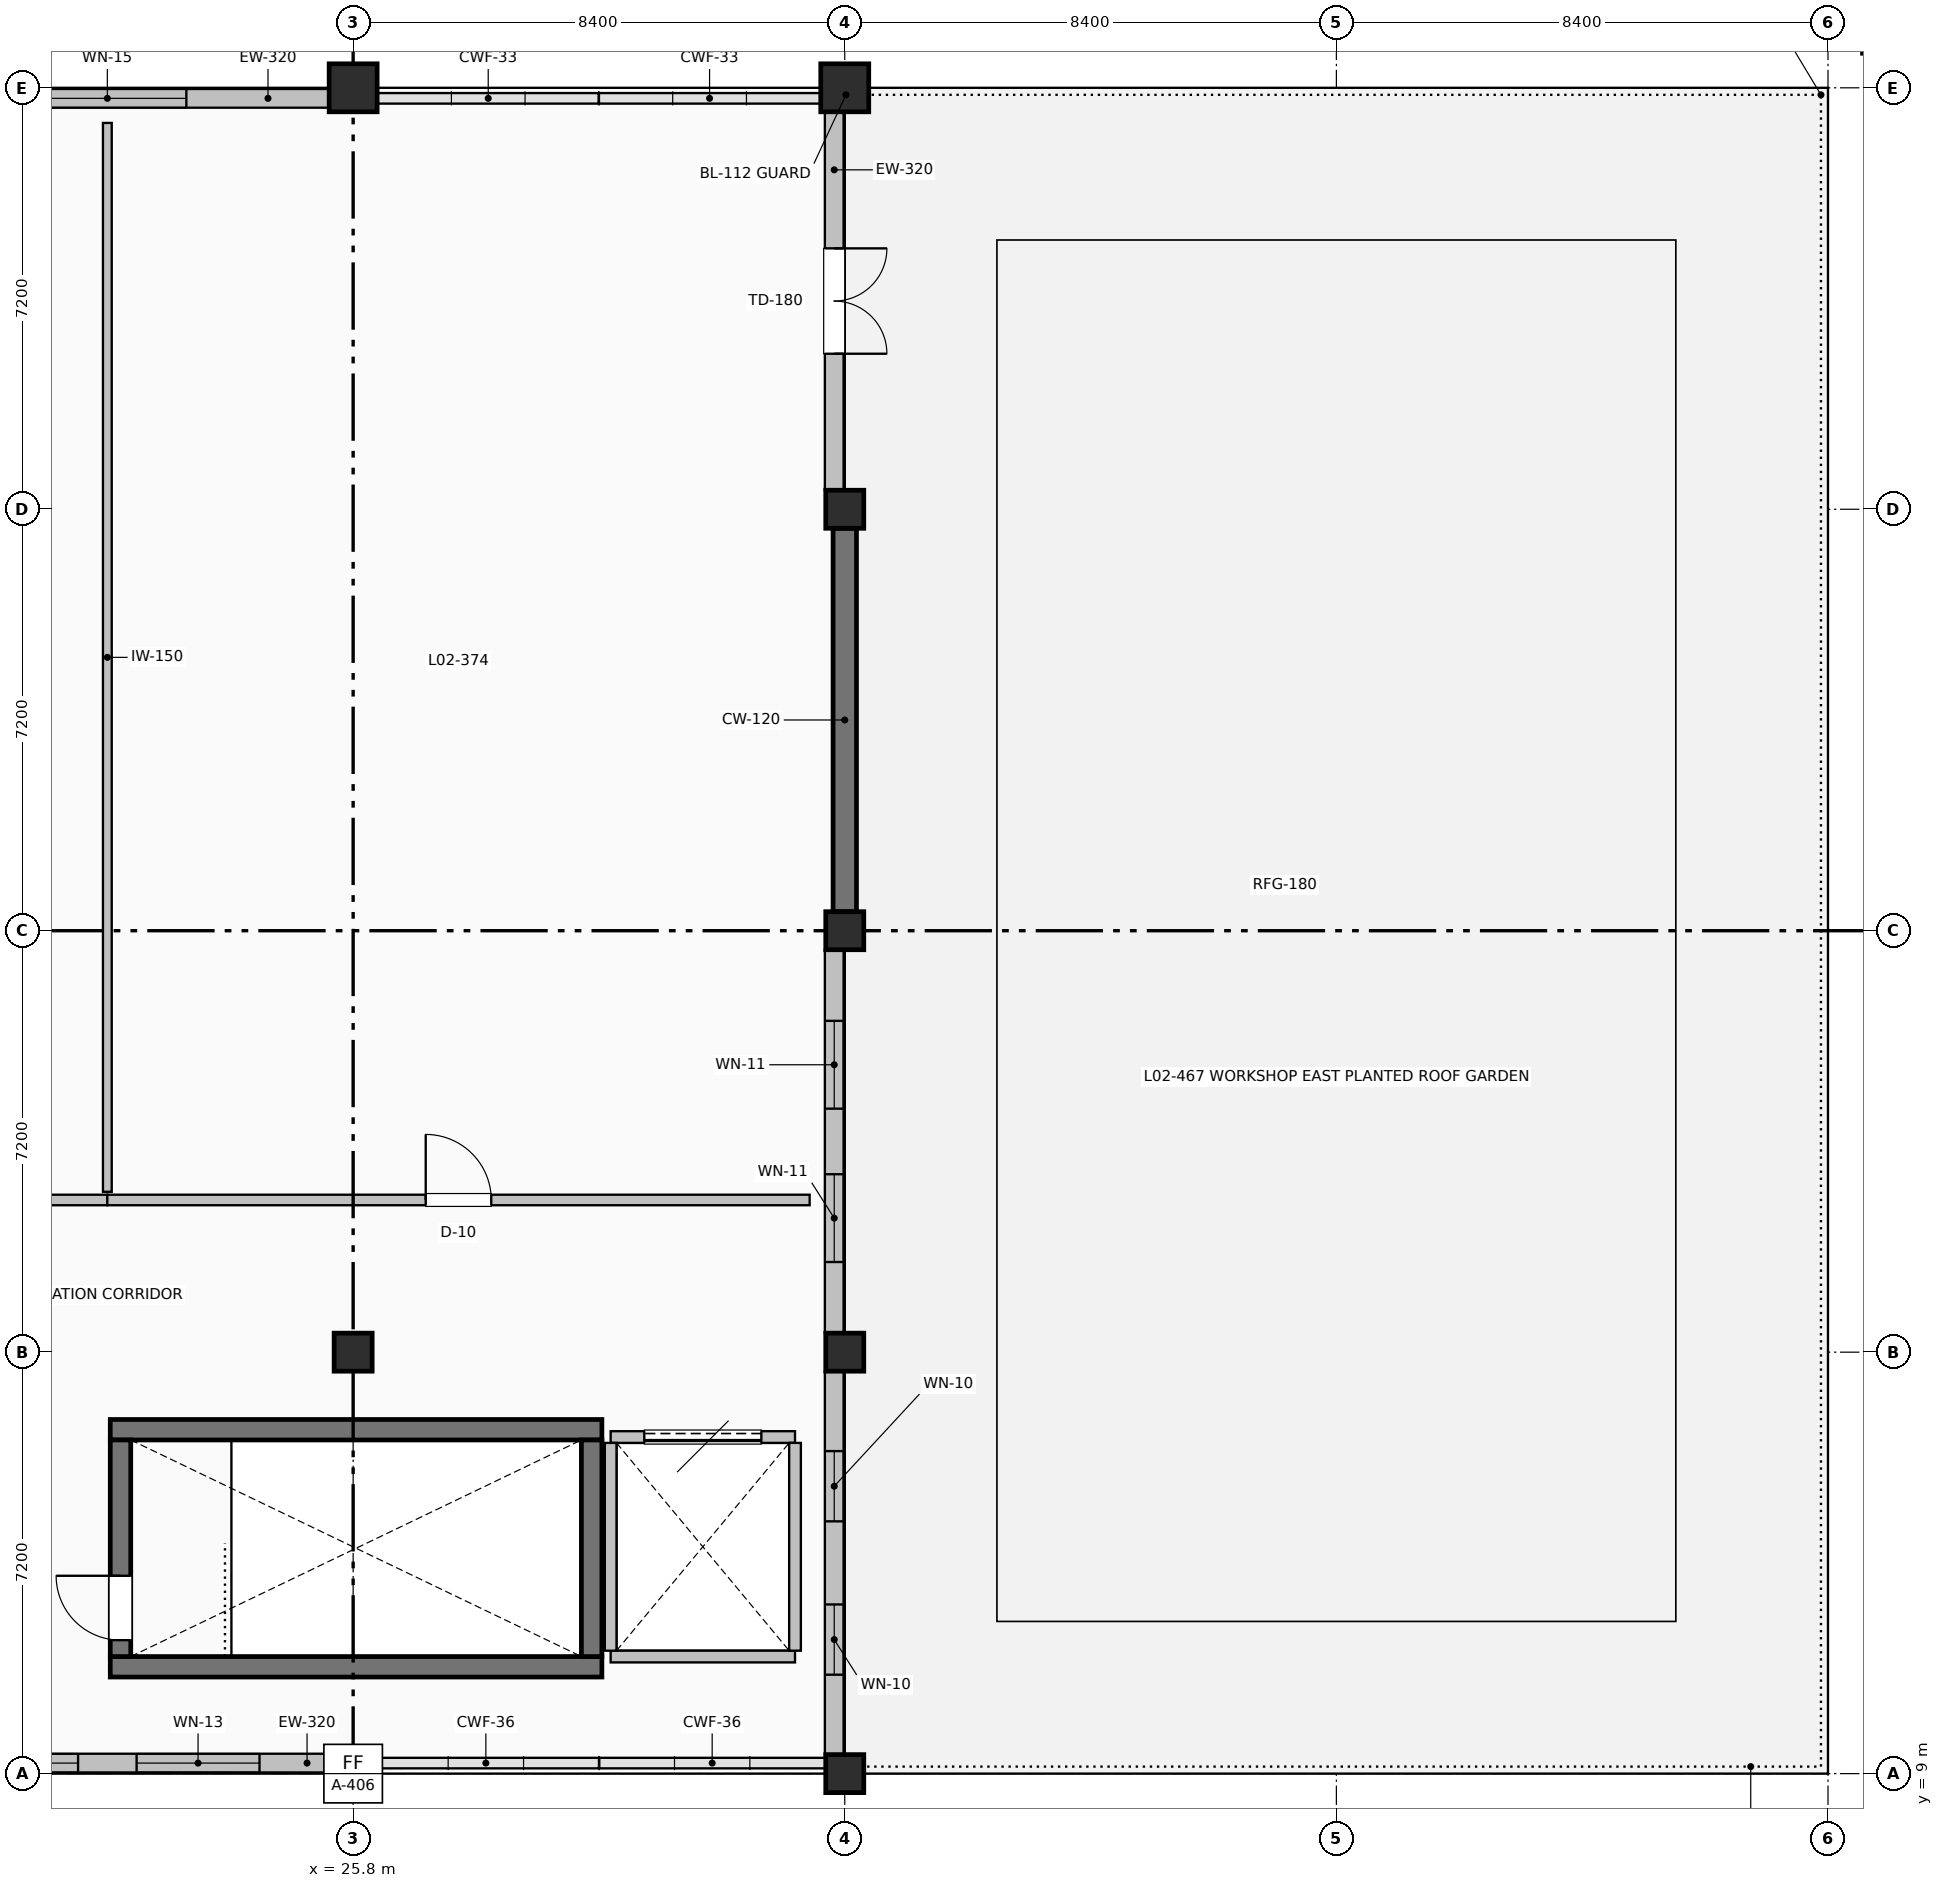
"""IFC4 building model, lengths in metres.
Left out: names, types, materials, properties, quantities, classifications, styles, units other than length and angle.
Written with IfcOpenShell. Run it as: python <this file> out.ifc"""

import sys

from ifc_helpers import new_model, si_unit, direction, frame, frame_2d, origin, origin_2d, place, context, subcontext, project, spatial, rectangle, extrude, element, fill, save


model = new_model("IFC4")
c1 = context("Model", 3, precision=1e-05, world=origin(), true_north=direction((0.0, 1.0)))
c2 = subcontext(c1, "Body", "Model", "MODEL_VIEW")
j1 = project(units=[si_unit("LENGTHUNIT", "METRE"), si_unit("PLANEANGLEUNIT", "RADIAN")], contexts=[c1])
p1 = place(None, origin())
s1 = spatial("IfcSite", under=j1, at=p1, CompositionType="ELEMENT")
p2 = place(p1, origin())
s2 = spatial("IfcBuilding", under=s1, at=p2, CompositionType="ELEMENT")
p3 = place(p2, frame((0.0, 0.0, 10.2)))
s3 = spatial("IfcBuildingStorey", under=s2, at=p3, CompositionType="ELEMENT", Elevation=10.2)
p4 = place(p3, frame((52.0, 38.8, 0.0), z_axis=(0.0, 0.0, 1.0), x_axis=(1.0, 0.0, 0.0)))
e1 = element("IfcColumn", 1, at=p4, inside=s3, PredefinedType="COLUMN", context=c2, shape_type="SweptSolid", body=[
    extrude(rectangle(XDim=0.82, YDim=0.82, at=origin_2d()), origin(), (0.0, 0.0, 1.0), 4.8),
])
for number, where, z_axis, x_axis in (
    (2, (25.8, 9.0, 0.0), (0.0, 0.0, 1.0), (1.0, 0.0, 0.0)),
    (3, (25.8, 16.2, 0.0), (0.0, 0.0, 1.0), (1.0, 0.0, 0.0)),
):
    element("IfcColumn", number, at=place(p3, frame(where, z_axis=z_axis, x_axis=x_axis)), inside=s3, PredefinedType="COLUMN", context=c2, shape_type="SweptSolid", body=[
        extrude(rectangle(XDim=0.65, YDim=0.65, at=origin_2d()), origin(), (0.0, 0.0, 1.0), 4.8),
    ])
p5 = place(p3, frame((25.8, 37.8, 0.0), z_axis=(0.0, 0.0, 1.0), x_axis=(1.0, 0.0, 0.0)))
e4 = element("IfcColumn", 4, at=p5, inside=s3, PredefinedType="COLUMN", context=c2, shape_type="SweptSolid", body=[
    extrude(rectangle(XDim=0.82, YDim=0.82, at=origin_2d()), origin(), (0.0, 0.0, 1.0), 4.8),
])
for number, where, z_axis, x_axis in (
    (5, (34.2, 9.0, 0.0), (0.0, 0.0, 1.0), (1.0, 0.0, 0.0)),
    (6, (34.2, 16.2, 0.0), (0.0, 0.0, 1.0), (1.0, 0.0, 0.0)),
    (7, (34.2, 23.4, 0.0), (0.0, 0.0, 1.0), (1.0, 0.0, 0.0)),
    (8, (34.2, 30.6, 0.0), (0.0, 0.0, 1.0), (1.0, 0.0, 0.0)),
):
    element("IfcColumn", number, at=place(p3, frame(where, z_axis=z_axis, x_axis=x_axis)), inside=s3, PredefinedType="COLUMN", context=c2, shape_type="SweptSolid", body=[
        extrude(rectangle(XDim=0.65, YDim=0.65, at=origin_2d()), origin(), (0.0, 0.0, 1.0), 4.8),
    ])
p6 = place(p3, frame((34.2, 37.8, 0.0), z_axis=(0.0, 0.0, 1.0), x_axis=(1.0, 0.0, 0.0)))
e9 = element("IfcColumn", 9, at=p6, inside=s3, PredefinedType="COLUMN", context=c2, shape_type="SweptSolid", body=[
    extrude(rectangle(XDim=0.82, YDim=0.82, at=origin_2d()), origin(), (0.0, 0.0, 1.0), 4.8),
])
for number, where, z_axis, x_axis in (
    (10, (21.65, 10.825, 0.0), (0.0, 0.0, 1.0), (1.0, 0.0, 0.0)),
    (11, (30.05, 14.875, 0.0), (0.0, 0.0, 1.0), (-1.0, 0.0, 0.0)),
):
    element("IfcWall", number, at=place(p3, frame(where, z_axis=z_axis, x_axis=x_axis)), inside=s3, PredefinedType="SHEAR", context=c2, shape_type="SweptSolid", body=[
        extrude(rectangle(XDim=8.4, YDim=0.35, at=frame_2d((4.2, 0.0))), origin(), (0.0, 0.0, 1.0), 4.58),
    ])
p7 = place(p3, frame((21.825, 11.0, 0.0), z_axis=(0.0, 0.0, 1.0), x_axis=(0.0, 1.0, 0.0)))
e12 = element("IfcWall", 12, at=p7, inside=s3, PredefinedType="SHEAR", context=c2, shape_type="SweptSolid", body=[
    extrude(rectangle(XDim=3.7, YDim=0.35, at=frame_2d((1.85, 0.0))), origin(), (0.0, 0.0, 1.0), 4.58),
])
p8 = place(p7, frame((0.28, 0.0, 0.0)))
e13 = element("IfcOpeningElement", 13, at=p8, cuts=e12, PredefinedType="OPENING", context=c2, shape_type="SweptSolid", body=[
    extrude(rectangle(XDim=1.1, YDim=2.08, at=frame_2d((0.55, 1.04))), frame((0.0, 0.185, 0.0), z_axis=(0.0, -1.0, 0.0), x_axis=(1.0, 0.0, 0.0)), (0.0, 0.0, 1.0), 0.37),
])
p9 = place(p3, frame((29.875, 14.7, 0.0), z_axis=(0.0, 0.0, 1.0), x_axis=(0.0, -1.0, 0.0)))
e14 = element("IfcWall", 14, at=p9, inside=s3, PredefinedType="SHEAR", context=c2, shape_type="SweptSolid", body=[
    extrude(rectangle(XDim=3.7, YDim=0.35, at=frame_2d((1.85, 0.0))), origin(), (0.0, 0.0, 1.0), 4.58),
])
p10 = place(p3, frame((34.2, 23.725, 0.0), z_axis=(0.0, 0.0, 1.0), x_axis=(0.0, 1.0, 0.0)))
e15 = element("IfcWall", 15, at=p10, inside=s3, PredefinedType="SHEAR", context=c2, shape_type="SweptSolid", body=[
    extrude(rectangle(XDim=6.55, YDim=0.4, at=frame_2d((3.275, 0.0))), origin(), (0.0, 0.0, 1.0), 4.48),
])
p11 = place(p3, frame((34.02, 37.39, 0.0), z_axis=(0.0, 0.0, 1.0), x_axis=(0.0, -1.0, 0.0)))
e16 = element("IfcWall", 16, at=p11, inside=s3, PredefinedType="SOLIDWALL", context=c2, shape_type="SweptSolid", body=[
    extrude(rectangle(XDim=6.465, YDim=0.32, at=frame_2d((3.232, 0.0))), origin(), (0.0, 0.0, 1.0), 3.822),
])
p12 = place(p11, frame((2.333, 0.0, 0.0)))
e17 = element("IfcOpeningElement", 17, at=p12, cuts=e16, PredefinedType="OPENING", context=c2, shape_type="SweptSolid", body=[
    extrude(rectangle(XDim=1.8, YDim=2.2, at=frame_2d((0.9, 1.1))), frame((0.0, 0.17, 0.0), z_axis=(0.0, -1.0, 0.0), x_axis=(1.0, 0.0, 0.0)), (0.0, 0.0, 1.0), 0.34),
])
p13 = place(p3, frame((34.02, 23.075, 0.0), z_axis=(0.0, 0.0, 1.0), x_axis=(0.0, -1.0, 0.0)))
e18 = element("IfcWall", 18, at=p13, inside=s3, PredefinedType="SOLIDWALL", context=c2, shape_type="SweptSolid", body=[
    extrude(rectangle(XDim=6.55, YDim=0.32, at=frame_2d((3.275, 0.0))), origin(), (0.0, 0.0, 1.0), 3.822),
])
p14 = place(p13, frame((1.215, 0.0, 0.95)))
e19 = element("IfcOpeningElement", 19, at=p14, cuts=e18, PredefinedType="OPENING", context=c2, shape_type="SweptSolid", body=[
    extrude(rectangle(XDim=1.5, YDim=1.9, at=frame_2d((0.75, 0.95))), frame((0.0, 0.17, 0.0), z_axis=(0.0, -1.0, 0.0), x_axis=(1.0, 0.0, 0.0)), (0.0, 0.0, 1.0), 0.34),
])
p15 = place(p13, frame((3.835, 0.0, 0.95)))
e20 = element("IfcOpeningElement", 20, at=p15, cuts=e18, PredefinedType="OPENING", context=c2, shape_type="SweptSolid", body=[
    extrude(rectangle(XDim=1.5, YDim=1.9, at=frame_2d((0.75, 0.95))), frame((0.0, 0.17, 0.0), z_axis=(0.0, -1.0, 0.0), x_axis=(1.0, 0.0, 0.0)), (0.0, 0.0, 1.0), 0.34),
])
p16 = place(p3, frame((34.02, 15.875, 0.0), z_axis=(0.0, 0.0, 1.0), x_axis=(0.0, -1.0, 0.0)))
e21 = element("IfcWall", 21, at=p16, inside=s3, PredefinedType="SOLIDWALL", context=c2, shape_type="SweptSolid", body=[
    extrude(rectangle(XDim=6.55, YDim=0.32, at=frame_2d((3.275, 0.0))), origin(), (0.0, 0.0, 1.0), 3.822),
])
p17 = place(p16, frame((1.365, 0.0, 0.95)))
e22 = element("IfcOpeningElement", 22, at=p17, cuts=e21, PredefinedType="OPENING", context=c2, shape_type="SweptSolid", body=[
    extrude(rectangle(XDim=1.2, YDim=1.9, at=frame_2d((0.6, 0.95))), frame((0.0, 0.17, 0.0), z_axis=(0.0, -1.0, 0.0), x_axis=(1.0, 0.0, 0.0)), (0.0, 0.0, 1.0), 0.34),
])
p18 = place(p16, frame((3.985, 0.0, 0.95)))
e23 = element("IfcOpeningElement", 23, at=p18, cuts=e21, PredefinedType="OPENING", context=c2, shape_type="SweptSolid", body=[
    extrude(rectangle(XDim=1.2, YDim=1.9, at=frame_2d((0.6, 0.95))), frame((0.0, 0.17, 0.0), z_axis=(0.0, -1.0, 0.0), x_axis=(1.0, 0.0, 0.0)), (0.0, 0.0, 1.0), 0.34),
])
p19 = place(p3, frame((17.81, 37.62, 0.0), z_axis=(0.0, 0.0, 1.0), x_axis=(1.0, 0.0, 0.0)))
e24 = element("IfcWall", 24, at=p19, inside=s3, PredefinedType="SOLIDWALL", context=c2, shape_type="SweptSolid", body=[
    extrude(rectangle(XDim=7.58, YDim=0.32, at=frame_2d((3.79, 0.0))), origin(), (0.0, 0.0, 1.0), 3.722),
])
p20 = place(p19, frame((2.44, 0.0, 0.95)))
e25 = element("IfcOpeningElement", 25, at=p20, cuts=e24, PredefinedType="OPENING", context=c2, shape_type="SweptSolid", body=[
    extrude(rectangle(XDim=2.7, YDim=1.9, at=frame_2d((1.35, 0.95))), frame((0.0, 0.17, 0.0), z_axis=(0.0, -1.0, 0.0), x_axis=(1.0, 0.0, 0.0)), (0.0, 0.0, 1.0), 0.34),
])
p21 = place(p3, frame((25.475, 9.18, 0.0), z_axis=(0.0, 0.0, 1.0), x_axis=(-1.0, 0.0, 0.0)))
e26 = element("IfcWall", 26, at=p21, inside=s3, PredefinedType="SOLIDWALL", context=c2, shape_type="SweptSolid", body=[
    extrude(rectangle(XDim=7.75, YDim=0.32, at=frame_2d((3.875, 0.0))), origin(), (0.0, 0.0, 1.0), 3.672),
])
p22 = place(p21, frame((1.275, 0.0, 0.95)))
e27 = element("IfcOpeningElement", 27, at=p22, cuts=e26, PredefinedType="OPENING", context=c2, shape_type="SweptSolid", body=[
    extrude(rectangle(XDim=2.1, YDim=1.9, at=frame_2d((1.05, 0.95))), frame((0.0, 0.17, 0.0), z_axis=(0.0, -1.0, 0.0), x_axis=(1.0, 0.0, 0.0)), (0.0, 0.0, 1.0), 0.34),
])
p23 = place(p21, frame((4.375, 0.0, 0.95)))
e28 = element("IfcOpeningElement", 28, at=p23, cuts=e26, PredefinedType="OPENING", context=c2, shape_type="SweptSolid", body=[
    extrude(rectangle(XDim=2.1, YDim=1.9, at=frame_2d((1.05, 0.95))), frame((0.0, 0.17, 0.0), z_axis=(0.0, -1.0, 0.0), x_axis=(1.0, 0.0, 0.0)), (0.0, 0.0, 1.0), 0.34),
])
p24 = place(p3, frame((30.2, 11.0, 0.0), z_axis=(0.0, 0.0, 1.0), x_axis=(1.0, 0.0, 0.0)))
e29 = element("IfcWall", 29, at=p24, inside=s3, PredefinedType="PARTITIONING", context=c2, shape_type="SweptSolid", body=[
    extrude(rectangle(XDim=3.15, YDim=0.2, at=frame_2d((1.575, 0.0))), origin(), (0.0, 0.0, 1.0), 4.492),
])
p25 = place(p3, frame((33.35, 14.75, 0.0), z_axis=(0.0, 0.0, 1.0), x_axis=(-1.0, 0.0, 0.0)))
e30 = element("IfcWall", 30, at=p25, inside=s3, PredefinedType="PARTITIONING", context=c2, shape_type="SweptSolid", body=[
    extrude(rectangle(XDim=3.15, YDim=0.2, at=frame_2d((1.575, 0.0))), origin(), (0.0, 0.0, 1.0), 4.492),
])
p26 = place(p25, frame((0.575, 0.0, 0.0)))
e31 = element("IfcOpeningElement", 31, at=p26, cuts=e30, PredefinedType="OPENING", context=c2, shape_type="SweptSolid", body=[
    extrude(rectangle(XDim=2.0, YDim=2.35, at=frame_2d((1.0, 1.175))), frame((0.0, 0.11, 0.0), z_axis=(0.0, -1.0, 0.0), x_axis=(1.0, 0.0, 0.0)), (0.0, 0.0, 1.0), 0.22),
])
for number, where, z_axis, x_axis in (
    (32, (30.2, 11.1, 0.0), (0.0, 0.0, 1.0), (0.0, 1.0, 0.0)),
    (33, (33.35, 14.65, 0.0), (0.0, 0.0, 1.0), (0.0, -1.0, 0.0)),
):
    element("IfcWall", number, at=place(p3, frame(where, z_axis=z_axis, x_axis=x_axis)), inside=s3, PredefinedType="PARTITIONING", context=c2, shape_type="SweptSolid", body=[
        extrude(rectangle(XDim=3.55, YDim=0.2, at=frame_2d((1.775, 0.0))), origin(), (0.0, 0.0, 1.0), 4.492),
    ])
p27 = place(p3, frame((9.6, 18.8, 0.0), z_axis=(0.0, 0.0, 1.0), x_axis=(1.0, 0.0, 0.0)))
e34 = element("IfcWall", 34, at=p27, inside=s3, PredefinedType="PARTITIONING", context=c2, shape_type="SweptSolid", body=[
    extrude(rectangle(XDim=12.0, YDim=0.18, at=frame_2d((6.0, 0.0))), origin(), (0.0, 0.0, 1.0), 4.492),
])
p28 = place(p27, frame((5.475, 0.0, 0.0)))
e35 = element("IfcOpeningElement", 35, at=p28, cuts=e34, PredefinedType="OPENING", context=c2, shape_type="SweptSolid", body=[
    extrude(rectangle(XDim=1.05, YDim=2.1, at=frame_2d((0.525, 1.05))), frame((0.0, 0.1, 0.0), z_axis=(0.0, -1.0, 0.0), x_axis=(1.0, 0.0, 0.0)), (0.0, 0.0, 1.0), 0.2),
])
p29 = place(p3, frame((21.6, 18.94, 0.0), z_axis=(0.0, 0.0, 1.0), x_axis=(0.0, 1.0, 0.0)))
e36 = element("IfcWall", 36, at=p29, inside=s3, PredefinedType="PARTITIONING", context=c2, shape_type="SweptSolid", body=[
    extrude(rectangle(XDim=18.26, YDim=0.15, at=frame_2d((9.13, 0.0))), origin(), (0.0, 0.0, 1.0), 4.492),
])
p30 = place(p3, frame((21.6, 18.8, 0.0), z_axis=(0.0, 0.0, 1.0), x_axis=(1.0, 0.0, 0.0)))
e37 = element("IfcWall", 37, at=p30, inside=s3, PredefinedType="PARTITIONING", context=c2, shape_type="SweptSolid", body=[
    extrude(rectangle(XDim=12.0, YDim=0.18, at=frame_2d((6.0, 0.0))), origin(), (0.0, 0.0, 1.0), 4.492),
])
p31 = place(p30, frame((5.44, 0.0, 0.0)))
e38 = element("IfcOpeningElement", 38, at=p31, cuts=e37, PredefinedType="OPENING", context=c2, shape_type="SweptSolid", body=[
    extrude(rectangle(XDim=1.12, YDim=2.12, at=frame_2d((0.56, 1.06))), frame((0.0, 0.1, 0.0), z_axis=(0.0, -1.0, 0.0), x_axis=(1.0, 0.0, 0.0)), (0.0, 0.0, 1.0), 0.2),
])
p32 = place(p12, origin())
e39 = element("IfcDoor", 39, at=p32, inside=s3, OperationType="DOUBLE_DOOR_SINGLE_SWING", PredefinedType="DOOR", context=c2, shape_type="SweptSolid", body=[
    extrude(rectangle(XDim=1.8, YDim=2.2, at=frame_2d((0.9, 1.1))), frame((0.0, 0.025, 0.0), z_axis=(0.0, -1.0, 0.0), x_axis=(1.0, 0.0, 0.0)), (0.0, 0.0, 1.0), 0.05),
])
fill(e17, e39)
p33 = place(p14, origin())
e40 = element("IfcWindow", 40, at=p33, inside=s3, PartitioningType="SINGLE_PANEL", PredefinedType="WINDOW", context=c2, shape_type="SweptSolid", body=[
    extrude(rectangle(XDim=1.5, YDim=1.9, at=frame_2d((0.75, 0.95))), frame((0.0, 0.03, 0.0), z_axis=(0.0, -1.0, 0.0), x_axis=(1.0, 0.0, 0.0)), (0.0, 0.0, 1.0), 0.06),
])
fill(e19, e40)
p34 = place(p15, origin())
e41 = element("IfcWindow", 41, at=p34, inside=s3, PartitioningType="SINGLE_PANEL", PredefinedType="WINDOW", context=c2, shape_type="SweptSolid", body=[
    extrude(rectangle(XDim=1.5, YDim=1.9, at=frame_2d((0.75, 0.95))), frame((0.0, 0.03, 0.0), z_axis=(0.0, -1.0, 0.0), x_axis=(1.0, 0.0, 0.0)), (0.0, 0.0, 1.0), 0.06),
])
fill(e20, e41)
p35 = place(p17, origin())
e42 = element("IfcWindow", 42, at=p35, inside=s3, PartitioningType="SINGLE_PANEL", PredefinedType="WINDOW", context=c2, shape_type="SweptSolid", body=[
    extrude(rectangle(XDim=1.2, YDim=1.9, at=frame_2d((0.6, 0.95))), frame((0.0, 0.03, 0.0), z_axis=(0.0, -1.0, 0.0), x_axis=(1.0, 0.0, 0.0)), (0.0, 0.0, 1.0), 0.06),
])
fill(e22, e42)
p36 = place(p18, origin())
e43 = element("IfcWindow", 43, at=p36, inside=s3, PartitioningType="SINGLE_PANEL", PredefinedType="WINDOW", context=c2, shape_type="SweptSolid", body=[
    extrude(rectangle(XDim=1.2, YDim=1.9, at=frame_2d((0.6, 0.95))), frame((0.0, 0.03, 0.0), z_axis=(0.0, -1.0, 0.0), x_axis=(1.0, 0.0, 0.0)), (0.0, 0.0, 1.0), 0.06),
])
fill(e23, e43)
p37 = place(p20, origin())
e44 = element("IfcWindow", 44, at=p37, inside=s3, PartitioningType="SINGLE_PANEL", PredefinedType="WINDOW", context=c2, shape_type="SweptSolid", body=[
    extrude(rectangle(XDim=2.7, YDim=1.9, at=frame_2d((1.35, 0.95))), frame((0.0, 0.03, 0.0), z_axis=(0.0, -1.0, 0.0), x_axis=(1.0, 0.0, 0.0)), (0.0, 0.0, 1.0), 0.06),
])
fill(e25, e44)
p38 = place(p22, origin())
e45 = element("IfcWindow", 45, at=p38, inside=s3, PartitioningType="SINGLE_PANEL", PredefinedType="WINDOW", context=c2, shape_type="SweptSolid", body=[
    extrude(rectangle(XDim=2.1, YDim=1.9, at=frame_2d((1.05, 0.95))), frame((0.0, 0.03, 0.0), z_axis=(0.0, -1.0, 0.0), x_axis=(1.0, 0.0, 0.0)), (0.0, 0.0, 1.0), 0.06),
])
fill(e27, e45)
p39 = place(p23, origin())
e46 = element("IfcWindow", 46, at=p39, inside=s3, PartitioningType="SINGLE_PANEL", PredefinedType="WINDOW", context=c2, shape_type="SweptSolid", body=[
    extrude(rectangle(XDim=2.1, YDim=1.9, at=frame_2d((1.05, 0.95))), frame((0.0, 0.03, 0.0), z_axis=(0.0, -1.0, 0.0), x_axis=(1.0, 0.0, 0.0)), (0.0, 0.0, 1.0), 0.06),
])
fill(e28, e46)
p40 = place(p8, origin())
e47 = element("IfcDoor", 47, at=p40, inside=s3, OperationType="SINGLE_SWING_RIGHT", PredefinedType="DOOR", context=c2, shape_type="SweptSolid", body=[
    extrude(rectangle(XDim=1.1, YDim=2.08, at=frame_2d((0.55, 1.04))), frame((0.0, 0.025, 0.0), z_axis=(0.0, -1.0, 0.0), x_axis=(1.0, 0.0, 0.0)), (0.0, 0.0, 1.0), 0.05),
])
fill(e13, e47)
p41 = place(p26, origin())
e48 = element("IfcDoor", 48, at=p41, inside=s3, OperationType="SLIDING_TO_LEFT", PredefinedType="DOOR", context=c2, shape_type="SweptSolid", body=[
    extrude(rectangle(XDim=2.0, YDim=2.35, at=frame_2d((1.0, 1.175))), frame((0.0, 0.025, 0.0), z_axis=(0.0, -1.0, 0.0), x_axis=(1.0, 0.0, 0.0)), (0.0, 0.0, 1.0), 0.05),
])
fill(e31, e48)
p42 = place(p31, origin())
e49 = element("IfcDoor", 49, at=p42, inside=s3, OperationType="SINGLE_SWING_LEFT", PredefinedType="DOOR", context=c2, shape_type="SweptSolid", body=[
    extrude(rectangle(XDim=1.12, YDim=2.12, at=frame_2d((0.56, 1.06))), frame((0.0, 0.025, 0.0), z_axis=(0.0, -1.0, 0.0), x_axis=(1.0, 0.0, 0.0)), (0.0, 0.0, 1.0), 0.05),
])
fill(e38, e49)
save(model, sys.argv[1])
